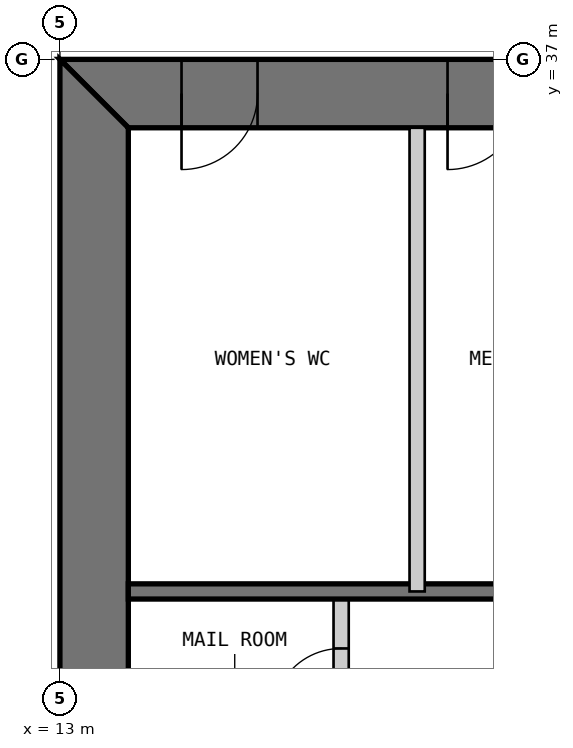
"""IFC4 building model, lengths in metres.
Left out: names, types, materials, properties, quantities, classifications, styles, units other than length and angle.
Written with IfcOpenShell. Run it as: python <this file> out.ifc"""

import sys

from ifc_helpers import new_model, si_unit, direction, frame, frame_2d, origin, place, context, subcontext, project, spatial, polyline, rectangle, outline, extrude, element, fill, save


model = new_model("IFC4")
c1 = context("Model", 3, precision=1e-05, world=origin(), true_north=direction((0.0, 1.0)))
c2 = subcontext(c1, "Body", "Model", "MODEL_VIEW")
j1 = project(units=[si_unit("LENGTHUNIT", "METRE"), si_unit("PLANEANGLEUNIT", "RADIAN")], contexts=[c1])
p1 = place(None, origin())
s1 = spatial("IfcSite", under=j1, at=p1, CompositionType="ELEMENT")
p2 = place(p1, origin())
s2 = spatial("IfcBuilding", under=s1, at=p2, CompositionType="ELEMENT")
p3 = place(p2, frame((0.0, 0.0, 209.8)))
s3 = spatial("IfcBuildingStorey", under=s2, at=p3, CompositionType="ELEMENT", Elevation=209.8)
p4 = place(p3, frame((37.0, 36.55, 0.0), z_axis=(0.0, 0.0, 1.0), x_axis=(-1.0, 0.0, 0.0)))
e1 = element("IfcWall", 1, at=p4, inside=s3, PredefinedType="SHEAR", context=c2, shape_type="SweptSolid", body=[
    extrude(outline(polyline([(0.0, -0.45), (24.0, -0.45), (23.1, 0.45), (0.9, 0.45), (0.0, -0.45)])), origin(), (0.0, 0.0, 1.0), 4.0),
])
p5 = place(p4, frame((4.9, 0.0, 0.0)))
e2 = element("IfcOpeningElement", 2, at=p5, cuts=e1, PredefinedType="OPENING", context=c2, shape_type="SweptSolid", body=[
    extrude(rectangle(XDim=1.0, YDim=2.2, at=frame_2d((0.5, 1.1))), frame((0.0, 0.46, 0.0), z_axis=(0.0, -1.0, 0.0), x_axis=(1.0, 0.0, 0.0)), (0.0, 0.0, 1.0), 0.92),
])
p6 = place(p4, frame((8.9, 0.0, 0.0)))
e3 = element("IfcOpeningElement", 3, at=p6, cuts=e1, PredefinedType="OPENING", context=c2, shape_type="SweptSolid", body=[
    extrude(rectangle(XDim=1.1, YDim=2.2, at=frame_2d((0.55, 1.1))), frame((0.0, 0.46, 0.0), z_axis=(0.0, -1.0, 0.0), x_axis=(1.0, 0.0, 0.0)), (0.0, 0.0, 1.0), 0.92),
])
p7 = place(p4, frame((15.05, 0.0, 0.0)))
e4 = element("IfcOpeningElement", 4, at=p7, cuts=e1, PredefinedType="OPENING", context=c2, shape_type="SweptSolid", body=[
    extrude(rectangle(XDim=0.9, YDim=2.2, at=frame_2d((0.45, 1.1))), frame((0.0, 0.46, 0.0), z_axis=(0.0, -1.0, 0.0), x_axis=(1.0, 0.0, 0.0)), (0.0, 0.0, 1.0), 0.92),
])
p8 = place(p4, frame((17.9, 0.0, 0.0)))
e5 = element("IfcOpeningElement", 5, at=p8, cuts=e1, PredefinedType="OPENING", context=c2, shape_type="SweptSolid", body=[
    extrude(rectangle(XDim=1.0, YDim=2.2, at=frame_2d((0.5, 1.1))), frame((0.0, 0.46, 0.0), z_axis=(0.0, -1.0, 0.0), x_axis=(1.0, 0.0, 0.0)), (0.0, 0.0, 1.0), 0.92),
])
p9 = place(p4, frame((21.4, 0.0, 0.0)))
e6 = element("IfcOpeningElement", 6, at=p9, cuts=e1, PredefinedType="OPENING", context=c2, shape_type="SweptSolid", body=[
    extrude(rectangle(XDim=1.0, YDim=2.2, at=frame_2d((0.5, 1.1))), frame((0.0, 0.46, 0.0), z_axis=(0.0, -1.0, 0.0), x_axis=(1.0, 0.0, 0.0)), (0.0, 0.0, 1.0), 0.92),
])
p10 = place(p3, frame((13.45, 36.1, 0.0), z_axis=(0.0, 0.0, 1.0), x_axis=(0.0, -1.0, 0.0)))
e7 = element("IfcWall", 7, at=p10, inside=s3, PredefinedType="SHEAR", context=c2, shape_type="SweptSolid", body=[
    extrude(outline(polyline([(-0.9, -0.45), (23.1, -0.45), (22.2, 0.45), (0.0, 0.45), (-0.9, -0.45)])), origin(), (0.0, 0.0, 1.0), 4.0),
])
p11 = place(p10, frame((20.2, 0.0, 0.0)))
e8 = element("IfcOpeningElement", 8, at=p11, cuts=e7, PredefinedType="OPENING", context=c2, shape_type="SweptSolid", body=[
    extrude(rectangle(XDim=1.0, YDim=2.2, at=frame_2d((0.5, 1.1))), frame((0.0, 0.46, 0.0), z_axis=(0.0, -1.0, 0.0), x_axis=(1.0, 0.0, 0.0)), (0.0, 0.0, 1.0), 0.92),
])
p12 = place(p10, frame((17.25, 0.0, 0.0)))
e9 = element("IfcOpeningElement", 9, at=p12, cuts=e7, PredefinedType="OPENING", context=c2, shape_type="SweptSolid", body=[
    extrude(rectangle(XDim=0.9, YDim=2.2, at=frame_2d((0.45, 1.1))), frame((0.0, 0.46, 0.0), z_axis=(0.0, -1.0, 0.0), x_axis=(1.0, 0.0, 0.0)), (0.0, 0.0, 1.0), 0.92),
])
p13 = place(p3, frame((16.7, 13.9, 0.0), z_axis=(0.0, 0.0, 1.0), x_axis=(0.0, 1.0, 0.0)))
e10 = element("IfcWall", 10, at=p13, inside=s3, PredefinedType="PARTITIONING", context=c2, shape_type="SweptSolid", body=[
    extrude(rectangle(XDim=16.1, YDim=0.2, at=frame_2d((8.05, 0.0))), origin(), (0.0, 0.0, 1.0), 3.8),
])
p14 = place(p13, frame((9.25, 0.0, 0.0)))
e11 = element("IfcOpeningElement", 11, at=p14, cuts=e10, PredefinedType="OPENING", context=c2, shape_type="SweptSolid", body=[
    extrude(rectangle(XDim=0.9, YDim=2.2, at=frame_2d((0.45, 1.1))), frame((0.0, 0.11, 0.0), z_axis=(0.0, -1.0, 0.0), x_axis=(1.0, 0.0, 0.0)), (0.0, 0.0, 1.0), 0.22),
])
p15 = place(p13, frame((14.45, 0.0, 0.0)))
e12 = element("IfcOpeningElement", 12, at=p15, cuts=e10, PredefinedType="OPENING", context=c2, shape_type="SweptSolid", body=[
    extrude(rectangle(XDim=0.9, YDim=2.2, at=frame_2d((0.45, 1.1))), frame((0.0, 0.11, 0.0), z_axis=(0.0, -1.0, 0.0), x_axis=(1.0, 0.0, 0.0)), (0.0, 0.0, 1.0), 0.22),
])
p16 = place(p3, frame((29.7, 30.0, 0.0), z_axis=(0.0, 0.0, 1.0), x_axis=(-1.0, 0.0, 0.0)))
e13 = element("IfcWall", 13, at=p16, inside=s3, PredefinedType="SOLIDWALL", context=c2, shape_type="SweptSolid", body=[
    extrude(rectangle(XDim=15.8, YDim=0.2, at=frame_2d((7.9, 0.0))), origin(), (0.0, 0.0, 1.0), 3.8),
])
p17 = place(p3, frame((17.7, 36.1, 0.0), z_axis=(0.0, 0.0, 1.0), x_axis=(0.0, -1.0, 0.0)))
e14 = element("IfcWall", 14, at=p17, inside=s3, PredefinedType="PARTITIONING", context=c2, shape_type="SweptSolid", body=[
    extrude(rectangle(XDim=6.1, YDim=0.2, at=frame_2d((3.05, 0.0))), origin(), (0.0, 0.0, 1.0), 3.8),
])
p18 = place(p15, origin())
e15 = element("IfcDoor", 15, at=p18, inside=s3, OperationType="SINGLE_SWING_LEFT", PredefinedType="DOOR", context=c2, shape_type="SweptSolid", body=[
    extrude(rectangle(XDim=0.9, YDim=2.2, at=frame_2d((0.45, 1.1))), frame((0.0, 0.025, 0.0), z_axis=(0.0, -1.0, 0.0), x_axis=(1.0, 0.0, 0.0)), (0.0, 0.0, 1.0), 0.05),
])
fill(e12, e15)
p19 = place(p8, origin())
e16 = element("IfcDoor", 16, at=p19, inside=s3, OperationType="SINGLE_SWING_RIGHT", PredefinedType="DOOR", context=c2, shape_type="SweptSolid", body=[
    extrude(rectangle(XDim=1.0, YDim=2.2, at=frame_2d((0.5, 1.1))), frame((0.0, 0.025, 0.0), z_axis=(0.0, -1.0, 0.0), x_axis=(1.0, 0.0, 0.0)), (0.0, 0.0, 1.0), 0.05),
    extrude(outline(polyline([(0.0, 0.0), (0.04, 0.0), (0.04, 2.16), (0.96, 2.16), (0.96, 0.0), (1.0, 0.0), (1.0, 2.2), (0.0, 2.2), (0.0, 0.0)])), frame((0.0, 0.3, 0.0), z_axis=(0.0, -1.0, 0.0), x_axis=(1.0, 0.0, 0.0)), (0.0, 0.0, 1.0), 0.6),
])
fill(e5, e16)
p20 = place(p9, origin())
e17 = element("IfcDoor", 17, at=p20, inside=s3, OperationType="SINGLE_SWING_RIGHT", PredefinedType="DOOR", context=c2, shape_type="SweptSolid", body=[
    extrude(rectangle(XDim=1.0, YDim=2.2, at=frame_2d((0.5, 1.1))), frame((0.0, 0.025, 0.0), z_axis=(0.0, -1.0, 0.0), x_axis=(1.0, 0.0, 0.0)), (0.0, 0.0, 1.0), 0.05),
    extrude(outline(polyline([(0.0, 0.0), (0.04, 0.0), (0.04, 2.16), (0.96, 2.16), (0.96, 0.0), (1.0, 0.0), (1.0, 2.2), (0.0, 2.2), (0.0, 0.0)])), frame((0.0, 0.3, 0.0), z_axis=(0.0, -1.0, 0.0), x_axis=(1.0, 0.0, 0.0)), (0.0, 0.0, 1.0), 0.6),
])
fill(e6, e17)
save(model, sys.argv[1])
